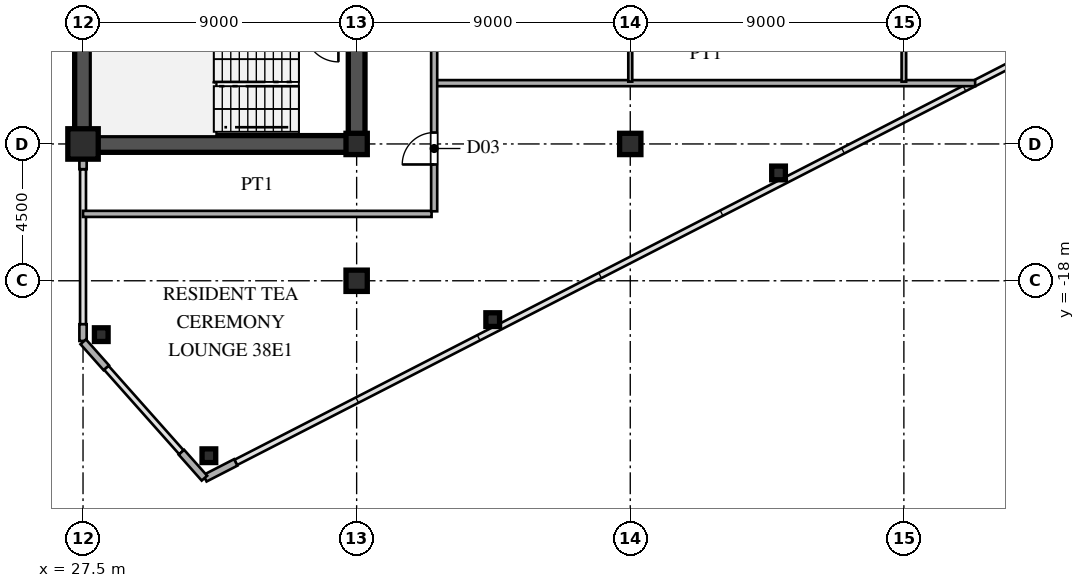
"""IFC4 building model, lengths in metres.
Left out: names, types, materials, properties, quantities, classifications, styles, units other than length and angle.
Written with IfcOpenShell. Run it as: python <this file> out.ifc"""

import sys

from ifc_helpers import new_model, si_unit, direction, frame, frame_2d, origin, origin_2d, place, context, subcontext, project, spatial, rectangle, hollow_rectangle, i_section, extrude, source, transform, mapped, element, fill, save


model = new_model("IFC4")
c1 = context("Model", 3, precision=1e-05, world=origin(), true_north=direction((0.0, 1.0)))
c2 = subcontext(c1, "Body", "Model", "MODEL_VIEW")
j1 = project(units=[si_unit("LENGTHUNIT", "METRE"), si_unit("PLANEANGLEUNIT", "RADIAN")], contexts=[c1])
p1 = place(None, origin())
s1 = spatial("IfcSite", under=j1, at=p1, CompositionType="ELEMENT")
p2 = place(p1, origin())
s2 = spatial("IfcBuilding", under=s1, at=p2, CompositionType="ELEMENT")
p3 = place(p2, frame((0.0, 0.0, 144.0)))
s3 = spatial("IfcBuildingStorey", under=s2, at=p3, CompositionType="ELEMENT", Elevation=144.0)
m1 = source(origin(), c2, "Body", "SweptSolid", [
    extrude(hollow_rectangle(XDim=1.0, YDim=1.0, WallThickness=0.042, at=origin_2d()), origin(), (0.0, 0.0, 1.0), 3.6),
])
p4 = place(p3, frame((27.5, -13.5, 0.0), z_axis=(0.0, 0.0, 1.0), x_axis=(1.0, 0.0, 0.0)))
e1 = element("IfcColumn", 1, at=p4, inside=s3, PredefinedType="COLUMN", context=c2, shape_type="MappedRepresentation", body=[
    mapped(m1, transform((0.0, 0.0, 0.0), scale=1.0)),
])
m2 = source(origin(), c2, "Body", "SweptSolid", [
    extrude(i_section(OverallWidth=0.7, OverallDepth=0.7, WebThickness=0.028, FlangeThickness=0.045, at=origin_2d()), origin(), (0.0, 0.0, 1.0), 3.6),
])
for number, where, z_axis, x_axis in (
    (2, (36.5, -18.0, 0.0), (0.0, 0.0, 1.0), (1.0, 0.0, 0.0)),
    (3, (36.5, -13.5, 0.0), (0.0, 0.0, 1.0), (1.0, 0.0, 0.0)),
    (4, (45.5, -13.5, 0.0), (0.0, 0.0, 1.0), (1.0, 0.0, 0.0)),
):
    element("IfcColumn", number, at=place(p3, frame(where, z_axis=z_axis, x_axis=x_axis)), inside=s3, PredefinedType="COLUMN", context=c2, shape_type="MappedRepresentation", body=[
        mapped(m2, transform((0.0, 0.0, 0.0), scale=1.0)),
    ])
m3 = source(origin(), c2, "Body", "SweptSolid", [
    extrude(hollow_rectangle(XDim=0.45, YDim=0.45, WallThickness=0.018, at=origin_2d()), origin(), (0.0, 0.0, 1.0), 3.6),
])
for number, where, z_axis, x_axis in (
    (5, (31.64, -23.754, 0.0), (0.0, 0.0, 1.0), (1.0, 0.0, 0.0)),
    (6, (28.1, -19.772, 0.0), (0.0, 0.0, 1.0), (1.0, 0.0, 0.0)),
    (7, (40.976, -19.278, 0.0), (0.0, 0.0, 1.0), (1.0, 0.0, 0.0)),
    (8, (50.377, -14.453, 0.0), (0.0, 0.0, 1.0), (1.0, 0.0, 0.0)),
):
    element("IfcColumn", number, at=place(p3, frame(where, z_axis=z_axis, x_axis=x_axis)), inside=s3, PredefinedType="COLUMN", context=c2, shape_type="MappedRepresentation", body=[
        mapped(m3, transform((0.0, 0.0, 0.0), scale=1.0)),
    ])
p5 = place(p3, frame((31.509, -24.495, 0.0), z_axis=(0.0, 0.0, 1.0), x_axis=(0.889797395748, 0.456355776255, 0.0)))
e9 = element("IfcWall", 9, at=p5, inside=s3, PredefinedType="SOLIDWALL", context=c2, shape_type="SweptSolid", body=[
    extrude(rectangle(XDim=1.14, YDim=0.24, at=frame_2d((0.57, 0.0))), origin(), (0.0, 0.0, 1.0), 3.38),
])
p6 = place(p3, frame((27.5, -19.98, 0.0), z_axis=(0.0, 0.0, 1.0), x_axis=(0.0, 1.0, 0.0)))
e10 = element("IfcWall", 10, at=p6, inside=s3, PredefinedType="SOLIDWALL", context=c2, shape_type="SweptSolid", body=[
    extrude(rectangle(XDim=0.55, YDim=0.24, at=frame_2d((0.275, 0.0))), origin(), (0.0, 0.0, 1.0), 3.38),
])
p7 = place(p3, frame((27.5, -14.33, 0.0), z_axis=(0.0, 0.0, 1.0), x_axis=(0.0, 1.0, 0.0)))
e11 = element("IfcWall", 11, at=p7, inside=s3, PredefinedType="SOLIDWALL", context=c2, shape_type="SweptSolid", body=[
    extrude(rectangle(XDim=0.55, YDim=0.24, at=frame_2d((0.275, 0.0))), origin(), (0.0, 0.0, 1.0), 2.88),
])
for number, where, z_axis, x_axis in (
    (12, (27.507, -20.008, 0.0), (0.0, 0.0, 1.0), (0.664, -0.747, 0.0)),
    (13, (30.736, -23.64, 0.0), (0.0, 0.0, 1.0), (0.664, -0.747, 0.0)),
):
    element("IfcWall", number, at=place(p3, frame(where, z_axis=z_axis, x_axis=x_axis)), inside=s3, PredefinedType="SOLIDWALL", context=c2, shape_type="SweptSolid", body=[
        extrude(rectangle(XDim=1.14, YDim=0.24, at=frame_2d((0.57, 0.0))), origin(), (0.0, 0.0, 1.0), 3.38),
    ])
p8 = place(p3, frame((27.5, -13.5, 0.0), z_axis=(0.0, 0.0, 1.0), x_axis=(0.0, 1.0, 0.0)))
e14 = element("IfcWall", 14, at=p8, inside=s3, PredefinedType="SHEAR", context=c2, shape_type="SweptSolid", body=[
    extrude(rectangle(XDim=12.2, YDim=0.55, at=frame_2d((6.1, 0.0))), origin(), (0.0, 0.0, 1.0), 3.38),
])
p9 = place(p3, frame((27.5, -13.5, 0.0), z_axis=(0.0, 0.0, 1.0), x_axis=(1.0, 0.0, 0.0)))
e15 = element("IfcWall", 15, at=p9, inside=s3, PredefinedType="SHEAR", context=c2, shape_type="SweptSolid", body=[
    extrude(rectangle(XDim=9.0, YDim=0.55, at=frame_2d((4.5, 0.0))), origin(), (0.0, 0.0, 1.0), 3.38),
])
p10 = place(p3, frame((36.5, -13.65, 0.0), z_axis=(0.0, 0.0, 1.0), x_axis=(0.0, 1.0, 0.0)))
e16 = element("IfcWall", 16, at=p10, inside=s3, PredefinedType="SHEAR", context=c2, shape_type="SweptSolid", body=[
    extrude(rectangle(XDim=7.15, YDim=0.55, at=frame_2d((3.575, 0.0))), origin(), (0.0, 0.0, 1.0), 3.38),
])
p11 = place(p10, frame((4.675, 0.0, 0.0)))
e17 = element("IfcOpeningElement", 17, at=p11, cuts=e16, PredefinedType="OPENING", context=c2, shape_type="SweptSolid", body=[
    extrude(rectangle(XDim=1.15, YDim=2.2, at=frame_2d((0.575, 1.1))), frame((0.0, 0.285, 0.0), z_axis=(0.0, -1.0, 0.0), x_axis=(1.0, 0.0, 0.0)), (0.0, 0.0, 1.0), 0.57),
])
p12 = place(p3, frame((27.5, -15.8, 0.0), z_axis=(0.0, 0.0, 1.0), x_axis=(1.0, 0.0, 0.0)))
e18 = element("IfcWall", 18, at=p12, inside=s3, PredefinedType="PARTITIONING", context=c2, shape_type="SweptSolid", body=[
    extrude(rectangle(XDim=11.465, YDim=0.2, at=frame_2d((5.732, 0.0))), origin(), (0.0, 0.0, 1.0), 3.38),
])
p13 = place(p3, frame((39.13, -11.5, 0.0), z_axis=(0.0, 0.0, 1.0), x_axis=(1.0, 0.0, 0.0)))
e19 = element("IfcWall", 19, at=p13, inside=s3, PredefinedType="PARTITIONING", context=c2, shape_type="SweptSolid", body=[
    extrude(rectangle(XDim=17.714, YDim=0.2, at=frame_2d((8.857, 0.0))), origin(), (0.0, 0.0, 1.0), 3.38),
])
p14 = place(p3, frame((39.05, -15.715, 0.0), z_axis=(0.0, 0.0, 1.0), x_axis=(0.0, 1.0, 0.0)))
e20 = element("IfcWall", 20, at=p14, inside=s3, PredefinedType="PARTITIONING", context=c2, shape_type="SweptSolid", body=[
    extrude(rectangle(XDim=31.43, YDim=0.2, at=frame_2d((15.715, 0.0))), origin(), (0.0, 0.0, 1.0), 3.38),
])
p15 = place(p14, frame((1.54, 0.0, 0.0)))
e21 = element("IfcOpeningElement", 21, at=p15, cuts=e20, PredefinedType="OPENING", context=c2, shape_type="SweptSolid", body=[
    extrude(rectangle(XDim=1.05, YDim=2.25, at=frame_2d((0.525, 1.125))), frame((0.0, 0.11, 0.0), z_axis=(0.0, -1.0, 0.0), x_axis=(1.0, 0.0, 0.0)), (0.0, 0.0, 1.0), 0.22),
])
p16 = place(p14, frame((8.782, 0.0, 0.0)))
e22 = element("IfcOpeningElement", 22, at=p16, cuts=e20, PredefinedType="OPENING", context=c2, shape_type="SweptSolid", body=[
    extrude(rectangle(XDim=1.05, YDim=2.25, at=frame_2d((0.525, 1.125))), frame((0.0, 0.11, 0.0), z_axis=(0.0, -1.0, 0.0), x_axis=(1.0, 0.0, 0.0)), (0.0, 0.0, 1.0), 0.22),
])
p17 = place(p14, frame((19.282, 0.0, 0.0)))
e23 = element("IfcOpeningElement", 23, at=p17, cuts=e20, PredefinedType="OPENING", context=c2, shape_type="SweptSolid", body=[
    extrude(rectangle(XDim=1.05, YDim=2.25, at=frame_2d((0.525, 1.125))), frame((0.0, 0.11, 0.0), z_axis=(0.0, -1.0, 0.0), x_axis=(1.0, 0.0, 0.0)), (0.0, 0.0, 1.0), 0.22),
])
p18 = place(p14, frame((27.84, 0.0, 0.0)))
e24 = element("IfcOpeningElement", 24, at=p18, cuts=e20, PredefinedType="OPENING", context=c2, shape_type="SweptSolid", body=[
    extrude(rectangle(XDim=1.05, YDim=2.25, at=frame_2d((0.525, 1.125))), frame((0.0, 0.11, 0.0), z_axis=(0.0, -1.0, 0.0), x_axis=(1.0, 0.0, 0.0)), (0.0, 0.0, 1.0), 0.22),
])
p19 = place(p3, frame((45.5, -11.45, 0.0), z_axis=(0.0, 0.0, 1.0), x_axis=(0.0, 1.0, 0.0)))
e25 = element("IfcWall", 25, at=p19, inside=s3, PredefinedType="PARTITIONING", context=c2, shape_type="SweptSolid", body=[
    extrude(rectangle(XDim=2.733, YDim=0.13, at=frame_2d((1.366, 0.0))), origin(), (0.0, 0.0, 1.0), 2.78),
])
p20 = place(p3, frame((54.5, -11.45, 0.0), z_axis=(0.0, 0.0, 1.0), x_axis=(0.0, 1.0, 0.0)))
e26 = element("IfcWall", 26, at=p20, inside=s3, PredefinedType="PARTITIONING", context=c2, shape_type="SweptSolid", body=[
    extrude(rectangle(XDim=20.9, YDim=0.15, at=frame_2d((10.45, 0.0))), origin(), (0.0, 0.0, 1.0), 2.78),
])
p21 = place(p20, frame((4.725, 0.0, 0.0)))
e27 = element("IfcOpeningElement", 27, at=p21, cuts=e26, PredefinedType="OPENING", context=c2, shape_type="SweptSolid", body=[
    extrude(rectangle(XDim=0.95, YDim=2.15, at=frame_2d((0.475, 1.075))), frame((0.0, 0.085, 0.0), z_axis=(0.0, -1.0, 0.0), x_axis=(1.0, 0.0, 0.0)), (0.0, 0.0, 1.0), 0.17),
])
p22 = place(p20, frame((1.225, 0.0, 0.0)))
e28 = element("IfcOpeningElement", 28, at=p22, cuts=e26, PredefinedType="OPENING", context=c2, shape_type="SweptSolid", body=[
    extrude(rectangle(XDim=0.95, YDim=2.15, at=frame_2d((0.475, 1.075))), frame((0.0, 0.085, 0.0), z_axis=(0.0, -1.0, 0.0), x_axis=(1.0, 0.0, 0.0)), (0.0, 0.0, 1.0), 0.17),
])
p23 = place(p20, frame((8.225, 0.0, 0.0)))
e29 = element("IfcOpeningElement", 29, at=p23, cuts=e26, PredefinedType="OPENING", context=c2, shape_type="SweptSolid", body=[
    extrude(rectangle(XDim=0.95, YDim=2.15, at=frame_2d((0.475, 1.075))), frame((0.0, 0.085, 0.0), z_axis=(0.0, -1.0, 0.0), x_axis=(1.0, 0.0, 0.0)), (0.0, 0.0, 1.0), 0.17),
])
p24 = place(p20, frame((14.552, 0.0, 0.0)))
e30 = element("IfcOpeningElement", 30, at=p24, cuts=e26, PredefinedType="OPENING", context=c2, shape_type="SweptSolid", body=[
    extrude(rectangle(XDim=0.95, YDim=2.15, at=frame_2d((0.475, 1.075))), frame((0.0, 0.085, 0.0), z_axis=(0.0, -1.0, 0.0), x_axis=(1.0, 0.0, 0.0)), (0.0, 0.0, 1.0), 0.17),
])
m4 = source(origin(), c2, "Body", "SweptSolid", [
    extrude(rectangle(XDim=1.05, YDim=2.25, at=frame_2d((0.525, 1.125))), frame((0.0, 0.025, 0.0), z_axis=(0.0, -1.0, 0.0), x_axis=(1.0, 0.0, 0.0)), (0.0, 0.0, 1.0), 0.05),
])
p25 = place(p15, origin())
e31 = element("IfcDoor", 31, at=p25, inside=s3, OperationType="SINGLE_SWING_LEFT", PredefinedType="DOOR", context=c2, shape_type="MappedRepresentation", body=[
    mapped(m4, transform((0.0, 0.0, 0.0), scale=1.0)),
])
fill(e21, e31)
save(model, sys.argv[1])
